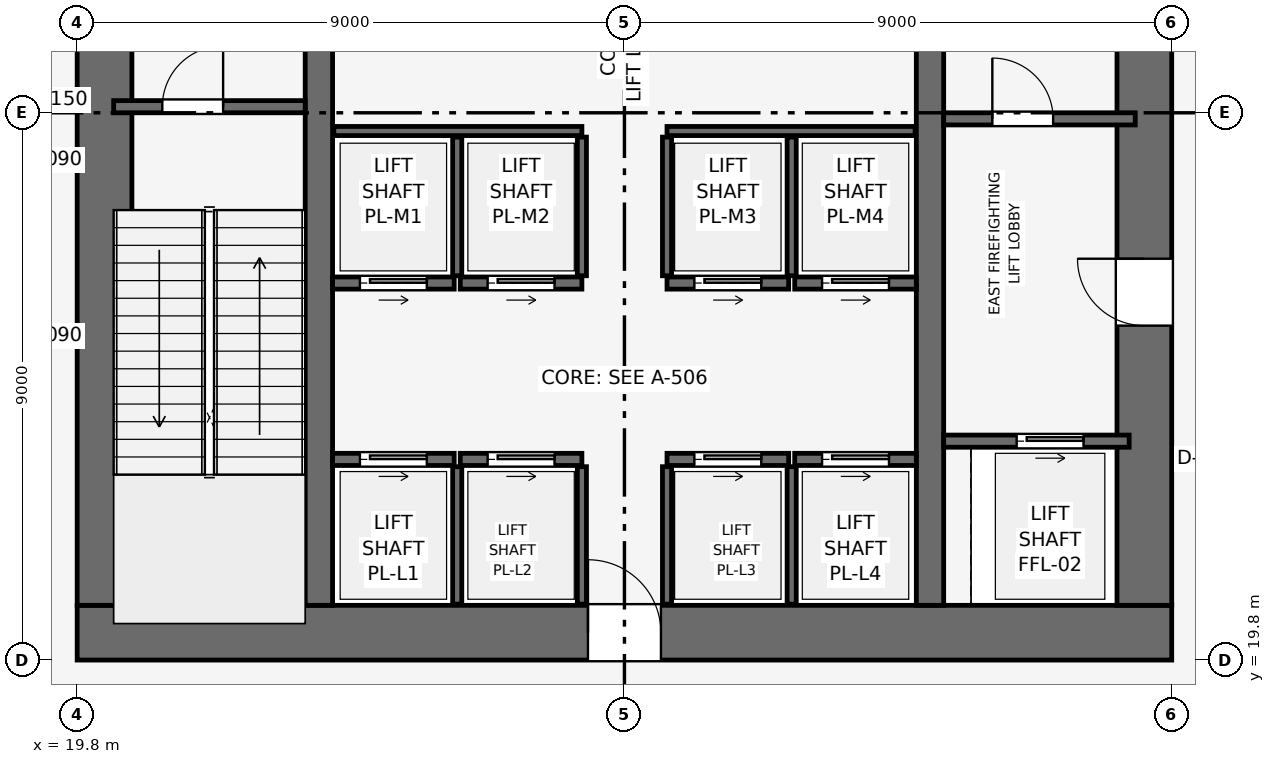
"""IFC4 building model, lengths in metres.
Left out: names, types, materials, properties, quantities, classifications, styles, units other than length and angle.
Written with IfcOpenShell. Run it as: python <this file> out.ifc"""

import sys

from ifc_helpers import new_model, si_unit, direction, frame, frame_2d, origin, place, context, subcontext, project, spatial, rectangle, extrude, element, fill, save


model = new_model("IFC4")
c1 = context("Model", 3, precision=1e-05, world=origin(), true_north=direction((0.0, 1.0)))
c2 = subcontext(c1, "Body", "Model", "MODEL_VIEW")
j1 = project(units=[si_unit("LENGTHUNIT", "METRE"), si_unit("PLANEANGLEUNIT", "RADIAN")], contexts=[c1])
p1 = place(None, origin())
s1 = spatial("IfcSite", under=j1, at=p1, CompositionType="ELEMENT")
p2 = place(p1, origin())
s2 = spatial("IfcBuilding", under=s1, at=p2, CompositionType="ELEMENT")
p3 = place(p2, frame((0.0, 0.0, 132.9)))
s3 = spatial("IfcBuildingStorey", under=s2, at=p3, CompositionType="ELEMENT", Elevation=132.9)
p4 = place(p3, frame((19.8, 20.25, 0.0), z_axis=(0.0, 0.0, 1.0), x_axis=(1.0, 0.0, 0.0)))
e1 = element("IfcWall", 1, at=p4, inside=s3, PredefinedType="SHEAR", context=c2, shape_type="SweptSolid", body=[
    extrude(rectangle(XDim=18.0, YDim=0.9, at=frame_2d((9.0, 0.0))), origin(), (0.0, 0.0, 1.0), 5.4),
])
p5 = place(p4, frame((8.4, 0.0, 0.0)))
e2 = element("IfcOpeningElement", 2, at=p5, cuts=e1, PredefinedType="OPENING", context=c2, shape_type="SweptSolid", body=[
    extrude(rectangle(XDim=1.2, YDim=2.2, at=frame_2d((0.6, 1.1))), frame((0.0, 0.46, 0.0), z_axis=(0.0, -1.0, 0.0), x_axis=(1.0, 0.0, 0.0)), (0.0, 0.0, 1.0), 0.92),
])
p6 = place(p3, frame((20.25, 20.7, 0.0), z_axis=(0.0, 0.0, 1.0), x_axis=(0.0, 1.0, 0.0)))
e3 = element("IfcWall", 3, at=p6, inside=s3, PredefinedType="SHEAR", context=c2, shape_type="SweptSolid", body=[
    extrude(rectangle(XDim=16.2, YDim=0.9, at=frame_2d((8.1, 0.0))), origin(), (0.0, 0.0, 1.0), 5.4),
])
p7 = place(p6, frame((10.1, 0.0, 0.0)))
e4 = element("IfcOpeningElement", 4, at=p7, cuts=e3, PredefinedType="OPENING", context=c2, shape_type="SweptSolid", body=[
    extrude(rectangle(XDim=1.1, YDim=2.15, at=frame_2d((0.55, 1.075))), frame((0.0, 0.46, 0.0), z_axis=(0.0, -1.0, 0.0), x_axis=(1.0, 0.0, 0.0)), (0.0, 0.0, 1.0), 0.92),
])
p8 = place(p3, frame((37.35, 20.7, 0.0), z_axis=(0.0, 0.0, 1.0), x_axis=(0.0, 1.0, 0.0)))
e5 = element("IfcWall", 5, at=p8, inside=s3, PredefinedType="SHEAR", context=c2, shape_type="SweptSolid", body=[
    extrude(rectangle(XDim=16.2, YDim=0.9, at=frame_2d((8.1, 0.0))), origin(), (0.0, 0.0, 1.0), 5.4),
])
p9 = place(p8, frame((4.6, 0.0, 0.0)))
e6 = element("IfcOpeningElement", 6, at=p9, cuts=e5, PredefinedType="OPENING", context=c2, shape_type="SweptSolid", body=[
    extrude(rectangle(XDim=1.1, YDim=2.15, at=frame_2d((0.55, 1.075))), frame((0.0, 0.46, 0.0), z_axis=(0.0, -1.0, 0.0), x_axis=(1.0, 0.0, 0.0)), (0.0, 0.0, 1.0), 0.92),
])
for number, where, z_axis, x_axis in (
    (7, (23.775, 20.7, 0.0), (0.0, 0.0, 1.0), (0.0, 1.0, 0.0)),
    (8, (33.825, 20.7, 0.0), (0.0, 0.0, 1.0), (0.0, 1.0, 0.0)),
):
    element("IfcWall", number, at=place(p3, frame(where, z_axis=z_axis, x_axis=x_axis)), inside=s3, PredefinedType="SHEAR", context=c2, shape_type="SweptSolid", body=[
        extrude(rectangle(XDim=16.2, YDim=0.45, at=frame_2d((8.1, 0.0))), origin(), (0.0, 0.0, 1.0), 5.4),
    ])
p10 = place(p3, frame((20.4, 28.9, 0.0), z_axis=(0.0, 0.0, 1.0), x_axis=(1.0, 0.0, 0.0)))
e9 = element("IfcWall", 9, at=p10, inside=s3, PredefinedType="SHEAR", context=c2, shape_type="SweptSolid", body=[
    extrude(rectangle(XDim=3.15, YDim=0.2, at=frame_2d((1.575, 0.0))), origin(), (0.0, 0.0, 1.0), 5.145),
])
p11 = place(p10, frame((0.8, 0.0, 0.0)))
e10 = element("IfcOpeningElement", 10, at=p11, cuts=e9, PredefinedType="OPENING", context=c2, shape_type="SweptSolid", body=[
    extrude(rectangle(XDim=1.0, YDim=2.1, at=frame_2d((0.5, 1.05))), frame((0.0, 0.11, 0.0), z_axis=(0.0, -1.0, 0.0), x_axis=(1.0, 0.0, 0.0)), (0.0, 0.0, 1.0), 0.22),
])
p12 = place(p3, frame((34.05, 28.7, 0.0), z_axis=(0.0, 0.0, 1.0), x_axis=(1.0, 0.0, 0.0)))
e11 = element("IfcWall", 11, at=p12, inside=s3, PredefinedType="SHEAR", context=c2, shape_type="SweptSolid", body=[
    extrude(rectangle(XDim=3.15, YDim=0.2, at=frame_2d((1.575, 0.0))), origin(), (0.0, 0.0, 1.0), 5.145),
])
p13 = place(p12, frame((0.8, 0.0, 0.0)))
e12 = element("IfcOpeningElement", 12, at=p13, cuts=e11, PredefinedType="OPENING", context=c2, shape_type="SweptSolid", body=[
    extrude(rectangle(XDim=1.0, YDim=2.1, at=frame_2d((0.5, 1.05))), frame((0.0, 0.11, 0.0), z_axis=(0.0, -1.0, 0.0), x_axis=(1.0, 0.0, 0.0)), (0.0, 0.0, 1.0), 0.22),
])
p14 = place(p3, frame((34.05, 23.4, 0.0), z_axis=(0.0, 0.0, 1.0), x_axis=(1.0, 0.0, 0.0)))
e13 = element("IfcWall", 13, at=p14, inside=s3, PredefinedType="SHEAR", context=c2, shape_type="SweptSolid", body=[
    extrude(rectangle(XDim=3.05, YDim=0.2, at=frame_2d((1.525, 0.0))), origin(), (0.0, 0.0, 1.0), 5.145),
])
p15 = place(p14, frame((1.2, 0.0, 0.0)))
e14 = element("IfcOpeningElement", 14, at=p15, cuts=e13, PredefinedType="OPENING", context=c2, shape_type="SweptSolid", body=[
    extrude(rectangle(XDim=1.1, YDim=2.15, at=frame_2d((0.55, 1.075))), frame((0.0, 0.11, 0.0), z_axis=(0.0, -1.0, 0.0), x_axis=(1.0, 0.0, 0.0)), (0.0, 0.0, 1.0), 0.22),
])
p16 = place(p3, frame((24.0, 23.1, 0.0), z_axis=(0.0, 0.0, 1.0), x_axis=(1.0, 0.0, 0.0)))
e15 = element("IfcWall", 15, at=p16, inside=s3, PredefinedType="SHEAR", context=c2, shape_type="SweptSolid", body=[
    extrude(rectangle(XDim=2.0, YDim=0.2, at=frame_2d((1.0, 0.0))), origin(), (0.0, 0.0, 1.0), 5.145),
])
p17 = place(p16, frame((0.45, 0.0, 0.0)))
e16 = element("IfcOpeningElement", 16, at=p17, cuts=e15, PredefinedType="OPENING", context=c2, shape_type="SweptSolid", body=[
    extrude(rectangle(XDim=1.1, YDim=2.15, at=frame_2d((0.55, 1.075))), frame((0.0, 0.11, 0.0), z_axis=(0.0, -1.0, 0.0), x_axis=(1.0, 0.0, 0.0)), (0.0, 0.0, 1.0), 0.22),
])
p18 = place(p3, frame((26.1, 23.1, 0.0), z_axis=(0.0, 0.0, 1.0), x_axis=(1.0, 0.0, 0.0)))
e17 = element("IfcWall", 17, at=p18, inside=s3, PredefinedType="SHEAR", context=c2, shape_type="SweptSolid", body=[
    extrude(rectangle(XDim=2.0, YDim=0.2, at=frame_2d((1.0, 0.0))), origin(), (0.0, 0.0, 1.0), 5.145),
])
p19 = place(p18, frame((0.45, 0.0, 0.0)))
e18 = element("IfcOpeningElement", 18, at=p19, cuts=e17, PredefinedType="OPENING", context=c2, shape_type="SweptSolid", body=[
    extrude(rectangle(XDim=1.1, YDim=2.15, at=frame_2d((0.55, 1.075))), frame((0.0, 0.11, 0.0), z_axis=(0.0, -1.0, 0.0), x_axis=(1.0, 0.0, 0.0)), (0.0, 0.0, 1.0), 0.22),
])
p20 = place(p3, frame((29.5, 23.1, 0.0), z_axis=(0.0, 0.0, 1.0), x_axis=(1.0, 0.0, 0.0)))
e19 = element("IfcWall", 19, at=p20, inside=s3, PredefinedType="SHEAR", context=c2, shape_type="SweptSolid", body=[
    extrude(rectangle(XDim=2.0, YDim=0.2, at=frame_2d((1.0, 0.0))), origin(), (0.0, 0.0, 1.0), 5.145),
])
p21 = place(p20, frame((0.45, 0.0, 0.0)))
e20 = element("IfcOpeningElement", 20, at=p21, cuts=e19, PredefinedType="OPENING", context=c2, shape_type="SweptSolid", body=[
    extrude(rectangle(XDim=1.1, YDim=2.15, at=frame_2d((0.55, 1.075))), frame((0.0, 0.11, 0.0), z_axis=(0.0, -1.0, 0.0), x_axis=(1.0, 0.0, 0.0)), (0.0, 0.0, 1.0), 0.22),
])
p22 = place(p3, frame((31.6, 23.1, 0.0), z_axis=(0.0, 0.0, 1.0), x_axis=(1.0, 0.0, 0.0)))
e21 = element("IfcWall", 21, at=p22, inside=s3, PredefinedType="SHEAR", context=c2, shape_type="SweptSolid", body=[
    extrude(rectangle(XDim=2.0, YDim=0.2, at=frame_2d((1.0, 0.0))), origin(), (0.0, 0.0, 1.0), 5.145),
])
p23 = place(p22, frame((0.45, 0.0, 0.0)))
e22 = element("IfcOpeningElement", 22, at=p23, cuts=e21, PredefinedType="OPENING", context=c2, shape_type="SweptSolid", body=[
    extrude(rectangle(XDim=1.1, YDim=2.15, at=frame_2d((0.55, 1.075))), frame((0.0, 0.11, 0.0), z_axis=(0.0, -1.0, 0.0), x_axis=(1.0, 0.0, 0.0)), (0.0, 0.0, 1.0), 0.22),
])
p24 = place(p3, frame((24.0, 26.0, 0.0), z_axis=(0.0, 0.0, 1.0), x_axis=(1.0, 0.0, 0.0)))
e23 = element("IfcWall", 23, at=p24, inside=s3, PredefinedType="SHEAR", context=c2, shape_type="SweptSolid", body=[
    extrude(rectangle(XDim=2.0, YDim=0.2, at=frame_2d((1.0, 0.0))), origin(), (0.0, 0.0, 1.0), 5.145),
])
p25 = place(p24, frame((0.45, 0.0, 0.0)))
e24 = element("IfcOpeningElement", 24, at=p25, cuts=e23, PredefinedType="OPENING", context=c2, shape_type="SweptSolid", body=[
    extrude(rectangle(XDim=1.1, YDim=2.15, at=frame_2d((0.55, 1.075))), frame((0.0, 0.11, 0.0), z_axis=(0.0, -1.0, 0.0), x_axis=(1.0, 0.0, 0.0)), (0.0, 0.0, 1.0), 0.22),
])
p26 = place(p3, frame((26.1, 26.0, 0.0), z_axis=(0.0, 0.0, 1.0), x_axis=(1.0, 0.0, 0.0)))
e25 = element("IfcWall", 25, at=p26, inside=s3, PredefinedType="SHEAR", context=c2, shape_type="SweptSolid", body=[
    extrude(rectangle(XDim=2.0, YDim=0.2, at=frame_2d((1.0, 0.0))), origin(), (0.0, 0.0, 1.0), 5.145),
])
p27 = place(p26, frame((0.45, 0.0, 0.0)))
e26 = element("IfcOpeningElement", 26, at=p27, cuts=e25, PredefinedType="OPENING", context=c2, shape_type="SweptSolid", body=[
    extrude(rectangle(XDim=1.1, YDim=2.15, at=frame_2d((0.55, 1.075))), frame((0.0, 0.11, 0.0), z_axis=(0.0, -1.0, 0.0), x_axis=(1.0, 0.0, 0.0)), (0.0, 0.0, 1.0), 0.22),
])
p28 = place(p3, frame((29.5, 26.0, 0.0), z_axis=(0.0, 0.0, 1.0), x_axis=(1.0, 0.0, 0.0)))
e27 = element("IfcWall", 27, at=p28, inside=s3, PredefinedType="SHEAR", context=c2, shape_type="SweptSolid", body=[
    extrude(rectangle(XDim=2.0, YDim=0.2, at=frame_2d((1.0, 0.0))), origin(), (0.0, 0.0, 1.0), 5.145),
])
p29 = place(p28, frame((0.45, 0.0, 0.0)))
e28 = element("IfcOpeningElement", 28, at=p29, cuts=e27, PredefinedType="OPENING", context=c2, shape_type="SweptSolid", body=[
    extrude(rectangle(XDim=1.1, YDim=2.15, at=frame_2d((0.55, 1.075))), frame((0.0, 0.11, 0.0), z_axis=(0.0, -1.0, 0.0), x_axis=(1.0, 0.0, 0.0)), (0.0, 0.0, 1.0), 0.22),
])
p30 = place(p3, frame((31.6, 26.0, 0.0), z_axis=(0.0, 0.0, 1.0), x_axis=(1.0, 0.0, 0.0)))
e29 = element("IfcWall", 29, at=p30, inside=s3, PredefinedType="SHEAR", context=c2, shape_type="SweptSolid", body=[
    extrude(rectangle(XDim=2.0, YDim=0.2, at=frame_2d((1.0, 0.0))), origin(), (0.0, 0.0, 1.0), 5.145),
])
p31 = place(p30, frame((0.45, 0.0, 0.0)))
e30 = element("IfcOpeningElement", 30, at=p31, cuts=e29, PredefinedType="OPENING", context=c2, shape_type="SweptSolid", body=[
    extrude(rectangle(XDim=1.1, YDim=2.15, at=frame_2d((0.55, 1.075))), frame((0.0, 0.11, 0.0), z_axis=(0.0, -1.0, 0.0), x_axis=(1.0, 0.0, 0.0)), (0.0, 0.0, 1.0), 0.22),
])
for number, where, z_axis, x_axis in (
    (31, (26.05, 20.72, 0.0), (0.0, 0.0, 1.0), (0.0, 1.0, 0.0)),
    (32, (28.1, 20.72, 0.0), (0.0, 0.0, 1.0), (0.0, 1.0, 0.0)),
    (33, (29.5, 20.72, 0.0), (0.0, 0.0, 1.0), (0.0, 1.0, 0.0)),
    (34, (31.55, 20.72, 0.0), (0.0, 0.0, 1.0), (0.0, 1.0, 0.0)),
):
    element("IfcWall", number, at=place(p3, frame(where, z_axis=z_axis, x_axis=x_axis)), inside=s3, PredefinedType="SHEAR", context=c2, shape_type="SweptSolid", body=[
        extrude(rectangle(XDim=2.26, YDim=0.15, at=frame_2d((1.13, 0.0))), origin(), (0.0, 0.0, 1.0), 5.145),
    ])
for number, where, z_axis, x_axis in (
    (35, (24.02, 28.5, 0.0), (0.0, 0.0, 1.0), (1.0, 0.0, 0.0)),
    (36, (29.5, 28.5, 0.0), (0.0, 0.0, 1.0), (1.0, 0.0, 0.0)),
):
    element("IfcWall", number, at=place(p3, frame(where, z_axis=z_axis, x_axis=x_axis)), inside=s3, PredefinedType="SHEAR", context=c2, shape_type="SweptSolid", body=[
        extrude(rectangle(XDim=4.08, YDim=0.15, at=frame_2d((2.04, 0.0))), origin(), (0.0, 0.0, 1.0), 5.145),
    ])
for number, where, z_axis, x_axis in (
    (37, (26.05, 26.12, 0.0), (0.0, 0.0, 1.0), (0.0, 1.0, 0.0)),
    (38, (28.1, 26.12, 0.0), (0.0, 0.0, 1.0), (0.0, 1.0, 0.0)),
    (39, (29.5, 26.12, 0.0), (0.0, 0.0, 1.0), (0.0, 1.0, 0.0)),
    (40, (31.55, 26.12, 0.0), (0.0, 0.0, 1.0), (0.0, 1.0, 0.0)),
):
    element("IfcWall", number, at=place(p3, frame(where, z_axis=z_axis, x_axis=x_axis)), inside=s3, PredefinedType="SHEAR", context=c2, shape_type="SweptSolid", body=[
        extrude(rectangle(XDim=2.28, YDim=0.15, at=frame_2d((1.14, 0.0))), origin(), (0.0, 0.0, 1.0), 5.145),
    ])
p32 = place(p11, origin())
e41 = element("IfcDoor", 41, at=p32, inside=s3, OperationType="SINGLE_SWING_RIGHT", PredefinedType="DOOR", context=c2, shape_type="SweptSolid", body=[
    extrude(rectangle(XDim=1.0, YDim=2.1, at=frame_2d((0.5, 1.05))), frame((0.0, 0.025, 0.0), z_axis=(0.0, -1.0, 0.0), x_axis=(1.0, 0.0, 0.0)), (0.0, 0.0, 1.0), 0.05),
])
fill(e10, e41)
p33 = place(p13, origin())
e42 = element("IfcDoor", 42, at=p33, inside=s3, OperationType="SINGLE_SWING_LEFT", PredefinedType="DOOR", context=c2, shape_type="SweptSolid", body=[
    extrude(rectangle(XDim=1.0, YDim=2.1, at=frame_2d((0.5, 1.05))), frame((0.0, 0.025, 0.0), z_axis=(0.0, -1.0, 0.0), x_axis=(1.0, 0.0, 0.0)), (0.0, 0.0, 1.0), 0.05),
])
fill(e12, e42)
p34 = place(p15, origin())
e43 = element("IfcDoor", 43, at=p34, inside=s3, OperationType="SLIDING_TO_RIGHT", PredefinedType="DOOR", context=c2, shape_type="SweptSolid", body=[
    extrude(rectangle(XDim=1.1, YDim=2.15, at=frame_2d((0.55, 1.075))), frame((0.0, 0.025, 0.0), z_axis=(0.0, -1.0, 0.0), x_axis=(1.0, 0.0, 0.0)), (0.0, 0.0, 1.0), 0.05),
])
fill(e14, e43)
p35 = place(p17, origin())
e44 = element("IfcDoor", 44, at=p35, inside=s3, OperationType="SLIDING_TO_RIGHT", PredefinedType="DOOR", context=c2, shape_type="SweptSolid", body=[
    extrude(rectangle(XDim=1.1, YDim=2.15, at=frame_2d((0.55, 1.075))), frame((0.0, 0.025, 0.0), z_axis=(0.0, -1.0, 0.0), x_axis=(1.0, 0.0, 0.0)), (0.0, 0.0, 1.0), 0.05),
])
fill(e16, e44)
p36 = place(p19, origin())
e45 = element("IfcDoor", 45, at=p36, inside=s3, OperationType="SLIDING_TO_RIGHT", PredefinedType="DOOR", context=c2, shape_type="SweptSolid", body=[
    extrude(rectangle(XDim=1.1, YDim=2.15, at=frame_2d((0.55, 1.075))), frame((0.0, 0.025, 0.0), z_axis=(0.0, -1.0, 0.0), x_axis=(1.0, 0.0, 0.0)), (0.0, 0.0, 1.0), 0.05),
])
fill(e18, e45)
p37 = place(p21, origin())
e46 = element("IfcDoor", 46, at=p37, inside=s3, OperationType="SLIDING_TO_RIGHT", PredefinedType="DOOR", context=c2, shape_type="SweptSolid", body=[
    extrude(rectangle(XDim=1.1, YDim=2.15, at=frame_2d((0.55, 1.075))), frame((0.0, 0.025, 0.0), z_axis=(0.0, -1.0, 0.0), x_axis=(1.0, 0.0, 0.0)), (0.0, 0.0, 1.0), 0.05),
])
fill(e20, e46)
p38 = place(p23, origin())
e47 = element("IfcDoor", 47, at=p38, inside=s3, OperationType="SLIDING_TO_RIGHT", PredefinedType="DOOR", context=c2, shape_type="SweptSolid", body=[
    extrude(rectangle(XDim=1.1, YDim=2.15, at=frame_2d((0.55, 1.075))), frame((0.0, 0.025, 0.0), z_axis=(0.0, -1.0, 0.0), x_axis=(1.0, 0.0, 0.0)), (0.0, 0.0, 1.0), 0.05),
])
fill(e22, e47)
p39 = place(p25, origin())
e48 = element("IfcDoor", 48, at=p39, inside=s3, OperationType="SLIDING_TO_RIGHT", PredefinedType="DOOR", context=c2, shape_type="SweptSolid", body=[
    extrude(rectangle(XDim=1.1, YDim=2.15, at=frame_2d((0.55, 1.075))), frame((0.0, 0.025, 0.0), z_axis=(0.0, -1.0, 0.0), x_axis=(1.0, 0.0, 0.0)), (0.0, 0.0, 1.0), 0.05),
])
fill(e24, e48)
p40 = place(p27, origin())
e49 = element("IfcDoor", 49, at=p40, inside=s3, OperationType="SLIDING_TO_RIGHT", PredefinedType="DOOR", context=c2, shape_type="SweptSolid", body=[
    extrude(rectangle(XDim=1.1, YDim=2.15, at=frame_2d((0.55, 1.075))), frame((0.0, 0.025, 0.0), z_axis=(0.0, -1.0, 0.0), x_axis=(1.0, 0.0, 0.0)), (0.0, 0.0, 1.0), 0.05),
])
fill(e26, e49)
p41 = place(p29, origin())
e50 = element("IfcDoor", 50, at=p41, inside=s3, OperationType="SLIDING_TO_RIGHT", PredefinedType="DOOR", context=c2, shape_type="SweptSolid", body=[
    extrude(rectangle(XDim=1.1, YDim=2.15, at=frame_2d((0.55, 1.075))), frame((0.0, 0.025, 0.0), z_axis=(0.0, -1.0, 0.0), x_axis=(1.0, 0.0, 0.0)), (0.0, 0.0, 1.0), 0.05),
])
fill(e28, e50)
p42 = place(p31, origin())
e51 = element("IfcDoor", 51, at=p42, inside=s3, OperationType="SLIDING_TO_RIGHT", PredefinedType="DOOR", context=c2, shape_type="SweptSolid", body=[
    extrude(rectangle(XDim=1.1, YDim=2.15, at=frame_2d((0.55, 1.075))), frame((0.0, 0.025, 0.0), z_axis=(0.0, -1.0, 0.0), x_axis=(1.0, 0.0, 0.0)), (0.0, 0.0, 1.0), 0.05),
])
fill(e30, e51)
p43 = place(p9, origin())
e52 = element("IfcDoor", 52, at=p43, inside=s3, OperationType="SINGLE_SWING_RIGHT", PredefinedType="DOOR", context=c2, shape_type="SweptSolid", body=[
    extrude(rectangle(XDim=1.1, YDim=2.15, at=frame_2d((0.55, 1.075))), frame((0.0, 0.025, 0.0), z_axis=(0.0, -1.0, 0.0), x_axis=(1.0, 0.0, 0.0)), (0.0, 0.0, 1.0), 0.05),
])
fill(e6, e52)
p44 = place(p5, origin())
e53 = element("IfcDoor", 53, at=p44, inside=s3, OperationType="SINGLE_SWING_LEFT", PredefinedType="DOOR", context=c2, shape_type="SweptSolid", body=[
    extrude(rectangle(XDim=1.2, YDim=2.2, at=frame_2d((0.6, 1.1))), frame((0.0, 0.025, 0.0), z_axis=(0.0, -1.0, 0.0), x_axis=(1.0, 0.0, 0.0)), (0.0, 0.0, 1.0), 0.05),
])
fill(e2, e53)
save(model, sys.argv[1])
